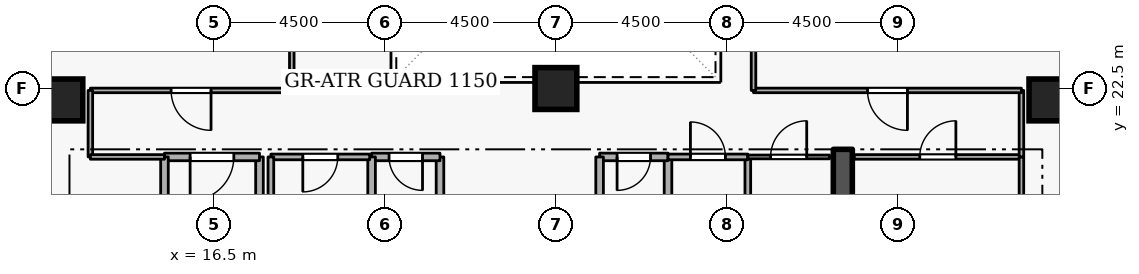
"""IFC4 building model, lengths in metres.
Left out: names, types, materials, properties, quantities, classifications, styles, units other than length and angle.
Written with IfcOpenShell. Run it as: python <this file> out.ifc"""

import sys

from ifc_helpers import new_model, si_unit, direction, frame, frame_2d, origin, origin_2d, place, context, subcontext, project, spatial, rectangle, extrude, element, fill, save


model = new_model("IFC4")
c1 = context("Model", 3, precision=1e-05, world=origin(), true_north=direction((0.0, 1.0)))
c2 = subcontext(c1, "Body", "Model", "MODEL_VIEW")
j1 = project(units=[si_unit("LENGTHUNIT", "METRE"), si_unit("PLANEANGLEUNIT", "RADIAN")], contexts=[c1])
p1 = place(None, origin())
s1 = spatial("IfcSite", under=j1, at=p1, CompositionType="ELEMENT")
p2 = place(p1, origin())
s2 = spatial("IfcBuilding", under=s1, at=p2, CompositionType="ELEMENT")
p3 = place(p2, frame((0.0, 0.0, 182.1)))
s3 = spatial("IfcBuildingStorey", under=s2, at=p3, CompositionType="ELEMENT", Elevation=182.1)
p4 = place(p3, frame((33.05, 15.1, 0.0), z_axis=(0.0, 0.0, 1.0), x_axis=(0.0, 1.0, 0.0)))
e1 = element("IfcWall", 1, at=p4, inside=s3, PredefinedType="SHEAR", context=c2, shape_type="SweptSolid", body=[
    extrude(rectangle(XDim=5.8, YDim=0.5, at=frame_2d((2.9, 0.0))), origin(), (0.0, 0.0, 1.0), 3.6),
])
for number, where, z_axis, x_axis in (
    (2, (12.5, 22.2, 0.0), (0.0, 0.0, 1.0), (1.0, 0.0, 0.0)),
    (3, (38.5, 22.2, 0.0), (0.0, 0.0, 1.0), (1.0, 0.0, 0.0)),
    (4, (25.5, 22.5, 0.0), (0.0, 0.0, 1.0), (1.0, 0.0, 0.0)),
):
    element("IfcColumn", number, at=place(p3, frame(where, z_axis=z_axis, x_axis=x_axis)), inside=s3, PredefinedType="COLUMN", context=c2, shape_type="SweptSolid", body=[
        extrude(rectangle(XDim=1.1, YDim=1.1, at=origin_2d()), origin(), (0.0, 0.0, 1.0), 3.6),
    ])
p5 = place(p3, frame((17.7, 18.4, 0.0), z_axis=(0.0, 0.0, 1.0), x_axis=(0.0, 1.0, 0.0)))
e5 = element("IfcWall", 5, at=p5, inside=s3, PredefinedType="STANDARD", context=c2, shape_type="SweptSolid", body=[
    extrude(rectangle(XDim=2.3, YDim=0.2, at=frame_2d((1.15, 0.0))), origin(), (0.0, 0.0, 1.0), 2.545),
])
p6 = place(p3, frame((17.7, 20.7, 0.0), z_axis=(0.0, 0.0, 1.0), x_axis=(-1.0, 0.0, 0.0)))
e6 = element("IfcWall", 6, at=p6, inside=s3, PredefinedType="STANDARD", context=c2, shape_type="SweptSolid", body=[
    extrude(rectangle(XDim=2.5, YDim=0.2, at=frame_2d((1.25, 0.0))), origin(), (0.0, 0.0, 1.0), 3.34),
])
p7 = place(p6, frame((0.675, 0.0, 0.0)))
e7 = element("IfcOpeningElement", 7, at=p7, cuts=e6, PredefinedType="OPENING", context=c2, shape_type="SweptSolid", body=[
    extrude(rectangle(XDim=1.15, YDim=2.1, at=frame_2d((0.575, 1.05))), frame((0.0, 0.11, 0.0), z_axis=(0.0, -1.0, 0.0), x_axis=(1.0, 0.0, 0.0)), (0.0, 0.0, 1.0), 0.22),
])
p8 = place(p3, frame((15.2, 20.7, 0.0), z_axis=(0.0, 0.0, 1.0), x_axis=(0.0, -1.0, 0.0)))
e8 = element("IfcWall", 8, at=p8, inside=s3, PredefinedType="STANDARD", context=c2, shape_type="SweptSolid", body=[
    extrude(rectangle(XDim=5.7, YDim=0.2, at=frame_2d((2.85, 0.0))), origin(), (0.0, 0.0, 1.0), 3.34),
])
p9 = place(p3, frame((28.45, 18.65, 0.0), z_axis=(0.0, 0.0, 1.0), x_axis=(0.0, 1.0, 0.0)))
e9 = element("IfcWall", 9, at=p9, inside=s3, PredefinedType="STANDARD", context=c2, shape_type="SweptSolid", body=[
    extrude(rectangle(XDim=2.05, YDim=0.2, at=frame_2d((1.025, 0.0))), origin(), (0.0, 0.0, 1.0), 3.34),
])
p10 = place(p3, frame((28.45, 20.7, 0.0), z_axis=(0.0, 0.0, 1.0), x_axis=(-1.0, 0.0, 0.0)))
e10 = element("IfcWall", 10, at=p10, inside=s3, PredefinedType="STANDARD", context=c2, shape_type="SweptSolid", body=[
    extrude(rectangle(XDim=1.8, YDim=0.2, at=frame_2d((0.9, 0.0))), origin(), (0.0, 0.0, 1.0), 3.34),
])
p11 = place(p10, frame((0.46, 0.0, 0.0)))
e11 = element("IfcOpeningElement", 11, at=p11, cuts=e10, PredefinedType="OPENING", context=c2, shape_type="SweptSolid", body=[
    extrude(rectangle(XDim=0.88, YDim=2.04, at=frame_2d((0.44, 1.02))), frame((0.0, 0.11, 0.0), z_axis=(0.0, -1.0, 0.0), x_axis=(1.0, 0.0, 0.0)), (0.0, 0.0, 1.0), 0.22),
])
for number, where, z_axis, x_axis in (
    (12, (26.65, 20.7, 0.0), (0.0, 0.0, 1.0), (0.0, -1.0, 0.0)),
    (13, (22.45, 18.65, 0.0), (0.0, 0.0, 1.0), (0.0, 1.0, 0.0)),
):
    element("IfcWall", number, at=place(p3, frame(where, z_axis=z_axis, x_axis=x_axis)), inside=s3, PredefinedType="STANDARD", context=c2, shape_type="SweptSolid", body=[
        extrude(rectangle(XDim=2.05, YDim=0.2, at=frame_2d((1.025, 0.0))), origin(), (0.0, 0.0, 1.0), 3.34),
    ])
p12 = place(p3, frame((22.45, 20.7, 0.0), z_axis=(0.0, 0.0, 1.0), x_axis=(-1.0, 0.0, 0.0)))
e14 = element("IfcWall", 14, at=p12, inside=s3, PredefinedType="STANDARD", context=c2, shape_type="SweptSolid", body=[
    extrude(rectangle(XDim=1.8, YDim=0.2, at=frame_2d((0.9, 0.0))), origin(), (0.0, 0.0, 1.0), 3.34),
])
p13 = place(p12, frame((0.46, 0.0, 0.0)))
e15 = element("IfcOpeningElement", 15, at=p13, cuts=e14, PredefinedType="OPENING", context=c2, shape_type="SweptSolid", body=[
    extrude(rectangle(XDim=0.88, YDim=2.04, at=frame_2d((0.44, 1.02))), frame((0.0, 0.11, 0.0), z_axis=(0.0, -1.0, 0.0), x_axis=(1.0, 0.0, 0.0)), (0.0, 0.0, 1.0), 0.22),
])
p14 = place(p3, frame((20.65, 20.7, 0.0), z_axis=(0.0, 0.0, 1.0), x_axis=(0.0, -1.0, 0.0)))
e16 = element("IfcWall", 16, at=p14, inside=s3, PredefinedType="STANDARD", context=c2, shape_type="SweptSolid", body=[
    extrude(rectangle(XDim=2.05, YDim=0.2, at=frame_2d((1.025, 0.0))), origin(), (0.0, 0.0, 1.0), 3.34),
])
p15 = place(p3, frame((20.6, 20.7, 0.0), z_axis=(0.0, 0.0, 1.0), x_axis=(-1.0, 0.0, 0.0)))
e17 = element("IfcWall", 17, at=p15, inside=s3, PredefinedType="PARTITIONING", context=c2, shape_type="SweptSolid", body=[
    extrude(rectangle(XDim=2.6, YDim=0.15, at=frame_2d((1.3, 0.0))), origin(), (0.0, 0.0, 1.0), 3.34),
])
p16 = place(p15, frame((0.84, 0.0, 0.0)))
e18 = element("IfcOpeningElement", 18, at=p16, cuts=e17, PredefinedType="OPENING", context=c2, shape_type="SweptSolid", body=[
    extrude(rectangle(XDim=0.92, YDim=2.08, at=frame_2d((0.46, 1.04))), frame((0.0, 0.085, 0.0), z_axis=(0.0, -1.0, 0.0), x_axis=(1.0, 0.0, 0.0)), (0.0, 0.0, 1.0), 0.17),
])
p17 = place(p3, frame((18.0, 20.7, 0.0), z_axis=(0.0, 0.0, 1.0), x_axis=(0.0, -1.0, 0.0)))
e19 = element("IfcWall", 19, at=p17, inside=s3, PredefinedType="PARTITIONING", context=c2, shape_type="SweptSolid", body=[
    extrude(rectangle(XDim=2.05, YDim=0.15, at=frame_2d((1.025, 0.0))), origin(), (0.0, 0.0, 1.0), 2.545),
])
p18 = place(p3, frame((30.55, 20.7, 0.0), z_axis=(0.0, 0.0, 1.0), x_axis=(0.0, -1.0, 0.0)))
e20 = element("IfcWall", 20, at=p18, inside=s3, PredefinedType="PARTITIONING", context=c2, shape_type="SweptSolid", body=[
    extrude(rectangle(XDim=2.05, YDim=0.15, at=frame_2d((1.025, 0.0))), origin(), (0.0, 0.0, 1.0), 3.34),
])
p19 = place(p3, frame((28.45, 20.7, 0.0), z_axis=(0.0, 0.0, 1.0), x_axis=(1.0, 0.0, 0.0)))
e21 = element("IfcWall", 21, at=p19, inside=s3, PredefinedType="PARTITIONING", context=c2, shape_type="SweptSolid", body=[
    extrude(rectangle(XDim=2.1, YDim=0.15, at=frame_2d((1.05, 0.0))), origin(), (0.0, 0.0, 1.0), 3.34),
])
p20 = place(p19, frame((0.59, 0.0, 0.0)))
e22 = element("IfcOpeningElement", 22, at=p20, cuts=e21, PredefinedType="OPENING", context=c2, shape_type="SweptSolid", body=[
    extrude(rectangle(XDim=0.92, YDim=2.08, at=frame_2d((0.46, 1.04))), frame((0.0, 0.085, 0.0), z_axis=(0.0, -1.0, 0.0), x_axis=(1.0, 0.0, 0.0)), (0.0, 0.0, 1.0), 0.17),
])
p21 = place(p3, frame((30.55, 20.7, 0.0), z_axis=(0.0, 0.0, 1.0), x_axis=(1.0, 0.0, 0.0)))
e23 = element("IfcWall", 23, at=p21, inside=s3, PredefinedType="PARTITIONING", context=c2, shape_type="SweptSolid", body=[
    extrude(rectangle(XDim=2.15, YDim=0.1, at=frame_2d((1.075, 0.0))), origin(), (0.0, 0.0, 1.0), 3.34),
])
p22 = place(p21, frame((0.6, 0.0, 0.0)))
e24 = element("IfcOpeningElement", 24, at=p22, cuts=e23, PredefinedType="OPENING", context=c2, shape_type="SweptSolid", body=[
    extrude(rectangle(XDim=0.95, YDim=2.1, at=frame_2d((0.475, 1.05))), frame((0.0, 0.06, 0.0), z_axis=(0.0, -1.0, 0.0), x_axis=(1.0, 0.0, 0.0)), (0.0, 0.0, 1.0), 0.12),
])
p23 = place(p3, frame((33.35, 20.7, 0.0), z_axis=(0.0, 0.0, 1.0), x_axis=(1.0, 0.0, 0.0)))
e25 = element("IfcWall", 25, at=p23, inside=s3, PredefinedType="PARTITIONING", context=c2, shape_type="SweptSolid", body=[
    extrude(rectangle(XDim=4.4, YDim=0.12, at=frame_2d((2.2, 0.0))), origin(), (0.0, 0.0, 1.0), 3.34),
])
p24 = place(p23, frame((1.725, 0.0, 0.0)))
e26 = element("IfcOpeningElement", 26, at=p24, cuts=e25, PredefinedType="OPENING", context=c2, shape_type="SweptSolid", body=[
    extrude(rectangle(XDim=0.95, YDim=2.1, at=frame_2d((0.475, 1.05))), frame((0.0, 0.07, 0.0), z_axis=(0.0, -1.0, 0.0), x_axis=(1.0, 0.0, 0.0)), (0.0, 0.0, 1.0), 0.14),
])
p25 = place(p3, frame((37.75, 20.7, 0.0), z_axis=(0.0, 0.0, 1.0), x_axis=(0.0, -1.0, 0.0)))
e27 = element("IfcWall", 27, at=p25, inside=s3, PredefinedType="PARTITIONING", context=c2, shape_type="SweptSolid", body=[
    extrude(rectangle(XDim=5.65, YDim=0.12, at=frame_2d((2.825, 0.0))), origin(), (0.0, 0.0, 1.0), 3.34),
])
p26 = place(p3, frame((18.55, 27.0, 0.0), z_axis=(0.0, 0.0, 1.0), x_axis=(0.0, -1.0, 0.0)))
e28 = element("IfcWall", 28, at=p26, inside=s3, PredefinedType="PARTITIONING", context=c2, shape_type="SweptSolid", body=[
    extrude(rectangle(XDim=4.55, YDim=0.12, at=frame_2d((2.275, 0.0))), origin(), (0.0, 0.0, 1.0), 3.34),
])
p27 = place(p3, frame((18.55, 22.45, 0.0), z_axis=(0.0, 0.0, 1.0), x_axis=(-1.0, 0.0, 0.0)))
e29 = element("IfcWall", 29, at=p27, inside=s3, PredefinedType="PARTITIONING", context=c2, shape_type="SweptSolid", body=[
    extrude(rectangle(XDim=5.3, YDim=0.12, at=frame_2d((2.65, 0.0))), origin(), (0.0, 0.0, 1.0), 3.34),
])
p28 = place(p27, frame((2.125, 0.0, 0.0)))
e30 = element("IfcOpeningElement", 30, at=p28, cuts=e29, PredefinedType="OPENING", context=c2, shape_type="SweptSolid", body=[
    extrude(rectangle(XDim=1.05, YDim=2.1, at=frame_2d((0.525, 1.05))), frame((0.0, 0.07, 0.0), z_axis=(0.0, -1.0, 0.0), x_axis=(1.0, 0.0, 0.0)), (0.0, 0.0, 1.0), 0.14),
])
p29 = place(p3, frame((13.25, 22.45, 0.0), z_axis=(0.0, 0.0, 1.0), x_axis=(0.0, -1.0, 0.0)))
e31 = element("IfcWall", 31, at=p29, inside=s3, PredefinedType="PARTITIONING", context=c2, shape_type="SweptSolid", body=[
    extrude(rectangle(XDim=1.75, YDim=0.12, at=frame_2d((0.875, 0.0))), origin(), (0.0, 0.0, 1.0), 3.34),
])
p30 = place(p3, frame((13.25, 20.7, 0.0), z_axis=(0.0, 0.0, 1.0), x_axis=(1.0, 0.0, 0.0)))
e32 = element("IfcWall", 32, at=p30, inside=s3, PredefinedType="PARTITIONING", context=c2, shape_type="SweptSolid", body=[
    extrude(rectangle(XDim=1.95, YDim=0.12, at=frame_2d((0.975, 0.0))), origin(), (0.0, 0.0, 1.0), 3.34),
])
p31 = place(p3, frame((37.75, 20.7, 0.0), z_axis=(0.0, 0.0, 1.0), x_axis=(0.0, 1.0, 0.0)))
e33 = element("IfcWall", 33, at=p31, inside=s3, PredefinedType="PARTITIONING", context=c2, shape_type="SweptSolid", body=[
    extrude(rectangle(XDim=1.75, YDim=0.12, at=frame_2d((0.875, 0.0))), origin(), (0.0, 0.0, 1.0), 3.34),
])
p32 = place(p3, frame((37.75, 22.45, 0.0), z_axis=(0.0, 0.0, 1.0), x_axis=(-1.0, 0.0, 0.0)))
e34 = element("IfcWall", 34, at=p32, inside=s3, PredefinedType="PARTITIONING", context=c2, shape_type="SweptSolid", body=[
    extrude(rectangle(XDim=7.05, YDim=0.12, at=frame_2d((3.525, 0.0))), origin(), (0.0, 0.0, 1.0), 3.34),
])
p33 = place(p32, frame((3.0, 0.0, 0.0)))
e35 = element("IfcOpeningElement", 35, at=p33, cuts=e34, PredefinedType="OPENING", context=c2, shape_type="SweptSolid", body=[
    extrude(rectangle(XDim=1.05, YDim=2.1, at=frame_2d((0.525, 1.05))), frame((0.0, 0.07, 0.0), z_axis=(0.0, -1.0, 0.0), x_axis=(1.0, 0.0, 0.0)), (0.0, 0.0, 1.0), 0.14),
])
p34 = place(p3, frame((30.7, 22.45, 0.0), z_axis=(0.0, 0.0, 1.0), x_axis=(0.0, 1.0, 0.0)))
e36 = element("IfcWall", 36, at=p34, inside=s3, PredefinedType="PARTITIONING", context=c2, shape_type="SweptSolid", body=[
    extrude(rectangle(XDim=4.55, YDim=0.12, at=frame_2d((2.275, 0.0))), origin(), (0.0, 0.0, 1.0), 3.34),
])
p35 = place(p7, origin())
e37 = element("IfcDoor", 37, at=p35, inside=s3, OperationType="SINGLE_SWING_RIGHT", PredefinedType="DOOR", context=c2, shape_type="SweptSolid", body=[
    extrude(rectangle(XDim=1.15, YDim=2.1, at=frame_2d((0.575, 1.05))), frame((0.0, 0.025, 0.0), z_axis=(0.0, -1.0, 0.0), x_axis=(1.0, 0.0, 0.0)), (0.0, 0.0, 1.0), 0.05),
])
fill(e7, e37)
p36 = place(p11, origin())
e38 = element("IfcDoor", 38, at=p36, inside=s3, OperationType="SINGLE_SWING_RIGHT", PredefinedType="DOOR", context=c2, shape_type="SweptSolid", body=[
    extrude(rectangle(XDim=0.88, YDim=2.04, at=frame_2d((0.44, 1.02))), frame((0.0, 0.025, 0.0), z_axis=(0.0, -1.0, 0.0), x_axis=(1.0, 0.0, 0.0)), (0.0, 0.0, 1.0), 0.05),
])
fill(e11, e38)
p37 = place(p13, origin())
e39 = element("IfcDoor", 39, at=p37, inside=s3, OperationType="SINGLE_SWING_LEFT", PredefinedType="DOOR", context=c2, shape_type="SweptSolid", body=[
    extrude(rectangle(XDim=0.88, YDim=2.04, at=frame_2d((0.44, 1.02))), frame((0.0, 0.025, 0.0), z_axis=(0.0, -1.0, 0.0), x_axis=(1.0, 0.0, 0.0)), (0.0, 0.0, 1.0), 0.05),
])
fill(e15, e39)
p38 = place(p16, origin())
e40 = element("IfcDoor", 40, at=p38, inside=s3, OperationType="SINGLE_SWING_RIGHT", PredefinedType="DOOR", context=c2, shape_type="SweptSolid", body=[
    extrude(rectangle(XDim=0.92, YDim=2.08, at=frame_2d((0.46, 1.04))), frame((0.0, 0.025, 0.0), z_axis=(0.0, -1.0, 0.0), x_axis=(1.0, 0.0, 0.0)), (0.0, 0.0, 1.0), 0.05),
])
fill(e18, e40)
p39 = place(p20, origin())
e41 = element("IfcDoor", 41, at=p39, inside=s3, OperationType="SINGLE_SWING_LEFT", PredefinedType="DOOR", context=c2, shape_type="SweptSolid", body=[
    extrude(rectangle(XDim=0.92, YDim=2.08, at=frame_2d((0.46, 1.04))), frame((0.0, 0.025, 0.0), z_axis=(0.0, -1.0, 0.0), x_axis=(1.0, 0.0, 0.0)), (0.0, 0.0, 1.0), 0.05),
])
fill(e22, e41)
p40 = place(p22, origin())
e42 = element("IfcDoor", 42, at=p40, inside=s3, OperationType="SINGLE_SWING_RIGHT", PredefinedType="DOOR", context=c2, shape_type="SweptSolid", body=[
    extrude(rectangle(XDim=0.95, YDim=2.1, at=frame_2d((0.475, 1.05))), frame((0.0, 0.025, 0.0), z_axis=(0.0, -1.0, 0.0), x_axis=(1.0, 0.0, 0.0)), (0.0, 0.0, 1.0), 0.05),
])
fill(e24, e42)
p41 = place(p24, origin())
e43 = element("IfcDoor", 43, at=p41, inside=s3, OperationType="SINGLE_SWING_RIGHT", PredefinedType="DOOR", context=c2, shape_type="SweptSolid", body=[
    extrude(rectangle(XDim=0.95, YDim=2.1, at=frame_2d((0.475, 1.05))), frame((0.0, 0.025, 0.0), z_axis=(0.0, -1.0, 0.0), x_axis=(1.0, 0.0, 0.0)), (0.0, 0.0, 1.0), 0.05),
])
fill(e26, e43)
p42 = place(p28, origin())
e44 = element("IfcDoor", 44, at=p42, inside=s3, OperationType="SINGLE_SWING_LEFT", PredefinedType="DOOR", context=c2, shape_type="SweptSolid", body=[
    extrude(rectangle(XDim=1.05, YDim=2.1, at=frame_2d((0.525, 1.05))), frame((0.0, 0.025, 0.0), z_axis=(0.0, -1.0, 0.0), x_axis=(1.0, 0.0, 0.0)), (0.0, 0.0, 1.0), 0.05),
])
fill(e30, e44)
p43 = place(p33, origin())
e45 = element("IfcDoor", 45, at=p43, inside=s3, OperationType="SINGLE_SWING_LEFT", PredefinedType="DOOR", context=c2, shape_type="SweptSolid", body=[
    extrude(rectangle(XDim=1.05, YDim=2.1, at=frame_2d((0.525, 1.05))), frame((0.0, 0.025, 0.0), z_axis=(0.0, -1.0, 0.0), x_axis=(1.0, 0.0, 0.0)), (0.0, 0.0, 1.0), 0.05),
])
fill(e35, e45)
save(model, sys.argv[1])
